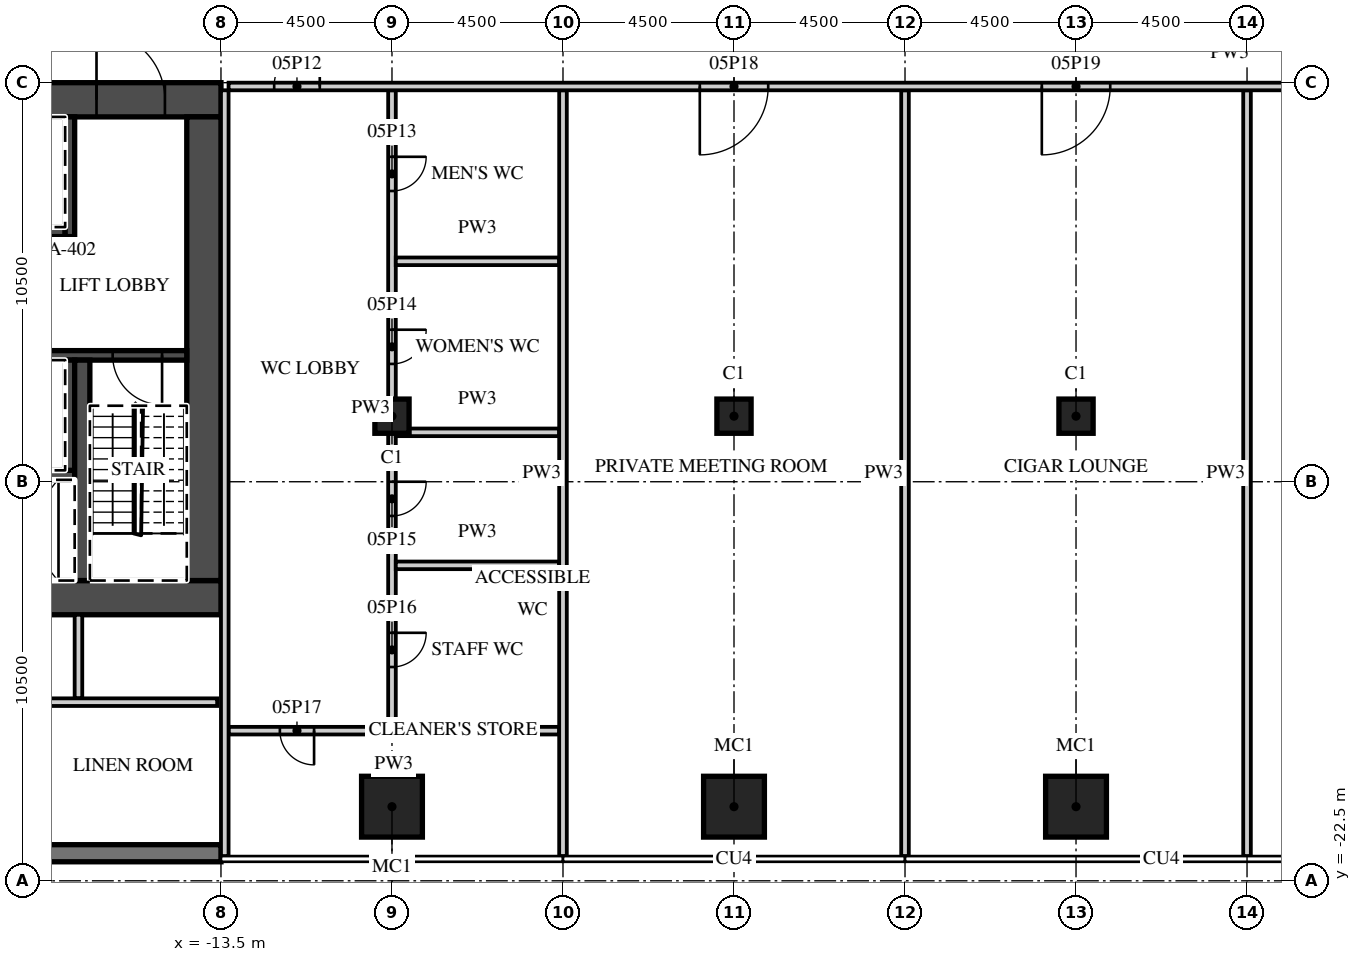
"""IFC4 building model, lengths in metres.
Left out: names, types, materials, properties, quantities, classifications, styles, units other than length and angle.
Written with IfcOpenShell. Run it as: python <this file> out.ifc"""

import sys

from ifc_helpers import new_model, si_unit, direction, frame, frame_2d, origin, origin_2d, place, context, subcontext, project, spatial, rectangle, extrude, element, fill, save


model = new_model("IFC4")
c1 = context("Model", 3, precision=1e-05, world=origin(), true_north=direction((0.0, 1.0)))
c2 = subcontext(c1, "Body", "Model", "MODEL_VIEW")
j1 = project(units=[si_unit("LENGTHUNIT", "METRE"), si_unit("PLANEANGLEUNIT", "RADIAN")], contexts=[c1])
p1 = place(None, origin())
s1 = spatial("IfcSite", under=j1, at=p1, CompositionType="ELEMENT")
p2 = place(p1, origin())
s2 = spatial("IfcBuilding", under=s1, at=p2, CompositionType="ELEMENT")
p3 = place(p2, frame((0.0, 0.0, 33.5)))
s3 = spatial("IfcBuildingStorey", under=s2, at=p3, CompositionType="ELEMENT", Elevation=33.5)
for number, where, z_axis, x_axis in (
    (1, (-9.0, -20.55, 0.0), (0.0, 0.0, 1.0), (1.0, 0.0, 0.0)),
    (2, (0.0, -20.55, 0.0), (0.0, 0.0, 1.0), (1.0, 0.0, 0.0)),
    (3, (9.0, -20.55, 0.0), (0.0, 0.0, 1.0), (1.0, 0.0, 0.0)),
):
    element("IfcColumn", number, at=place(p3, frame(where, z_axis=z_axis, x_axis=x_axis)), inside=s3, PredefinedType="COLUMN", context=c2, shape_type="SweptSolid", body=[
        extrude(rectangle(XDim=1.6, YDim=1.6, at=origin_2d()), origin(), (0.0, 0.0, 1.0), 4.5),
    ])
for number, where, z_axis, x_axis in (
    (4, (-9.0, -10.275, 0.0), (0.0, 0.0, 1.0), (1.0, 0.0, 0.0)),
    (5, (0.0, -10.275, 0.0), (0.0, 0.0, 1.0), (1.0, 0.0, 0.0)),
    (6, (9.0, -10.275, 0.0), (0.0, 0.0, 1.0), (1.0, 0.0, 0.0)),
):
    element("IfcColumn", number, at=place(p3, frame(where, z_axis=z_axis, x_axis=x_axis)), inside=s3, PredefinedType="COLUMN", context=c2, shape_type="SweptSolid", body=[
        extrude(rectangle(XDim=0.9, YDim=0.9, at=origin_2d()), origin(), (0.0, 0.0, 1.0), 4.5),
    ])
p4 = place(p3, frame((-31.5, -21.775, 0.0), z_axis=(0.0, 0.0, 1.0), x_axis=(1.0, 0.0, 0.0)))
e7 = element("IfcWall", 7, at=p4, inside=s3, PredefinedType="SOLIDWALL", context=c2, shape_type="SweptSolid", body=[
    extrude(rectangle(XDim=18.0, YDim=0.45, at=frame_2d((9.0, 0.0))), origin(), (0.0, 0.0, 1.0), 4.05),
])
p5 = place(p3, frame((-31.5, -1.95, 0.0), z_axis=(0.0, 0.0, 1.0), x_axis=(1.0, 0.0, 0.0)))
e8 = element("IfcWall", 8, at=p5, inside=s3, PredefinedType="SHEAR", context=c2, shape_type="SweptSolid", body=[
    extrude(rectangle(XDim=18.0, YDim=0.9, at=frame_2d((9.0, 0.0))), origin(), (0.0, 0.0, 1.0), 4.05),
])
p6 = place(p5, frame((14.725, 0.0, 0.0)))
e9 = element("IfcOpeningElement", 9, at=p6, cuts=e8, PredefinedType="OPENING", context=c2, shape_type="SweptSolid", body=[
    extrude(rectangle(XDim=1.8, YDim=2.1, at=frame_2d((0.9, 1.05))), frame((0.0, 0.46, 0.0), z_axis=(0.0, -1.0, 0.0), x_axis=(1.0, 0.0, 0.0)), (0.0, 0.0, 1.0), 0.92),
])
p7 = place(p3, frame((-20.3, -15.05, 0.0), z_axis=(0.0, 0.0, 1.0), x_axis=(1.0, 0.0, 0.0)))
e10 = element("IfcWall", 10, at=p7, inside=s3, PredefinedType="SHEAR", context=c2, shape_type="SweptSolid", body=[
    extrude(rectangle(XDim=6.8, YDim=0.9, at=frame_2d((3.4, 0.0))), origin(), (0.0, 0.0, 1.0), 4.05),
])
p8 = place(p7, frame((0.875, 0.0, 0.0)))
e11 = element("IfcOpeningElement", 11, at=p8, cuts=e10, PredefinedType="OPENING", context=c2, shape_type="SweptSolid", body=[
    extrude(rectangle(XDim=1.2, YDim=2.1, at=frame_2d((0.6, 1.05))), frame((0.0, 0.46, 0.0), z_axis=(0.0, -1.0, 0.0), x_axis=(1.0, 0.0, 0.0)), (0.0, 0.0, 1.0), 0.92),
])
p9 = place(p3, frame((-13.95, -14.6, 0.0), z_axis=(0.0, 0.0, 1.0), x_axis=(0.0, 1.0, 0.0)))
e12 = element("IfcWall", 12, at=p9, inside=s3, PredefinedType="SHEAR", context=c2, shape_type="SweptSolid", body=[
    extrude(rectangle(XDim=12.2, YDim=0.9, at=frame_2d((6.1, 0.0))), origin(), (0.0, 0.0, 1.0), 4.05),
])
p10 = place(p3, frame((-30.6, -5.425, 0.0), z_axis=(0.0, 0.0, 1.0), x_axis=(1.0, 0.0, 0.0)))
e13 = element("IfcWall", 13, at=p10, inside=s3, PredefinedType="SHEAR", context=c2, shape_type="SweptSolid", body=[
    extrude(rectangle(XDim=13.0, YDim=0.25, at=frame_2d((6.5, 0.0))), origin(), (0.0, 0.0, 1.0), 4.05),
])
p11 = place(p3, frame((-17.475, -5.55, 0.0), z_axis=(0.0, 0.0, 1.0), x_axis=(0.0, 1.0, 0.0)))
e14 = element("IfcWall", 14, at=p11, inside=s3, PredefinedType="SHEAR", context=c2, shape_type="SweptSolid", body=[
    extrude(rectangle(XDim=3.15, YDim=0.25, at=frame_2d((1.575, 0.0))), origin(), (0.0, 0.0, 1.0), 4.05),
])
p12 = place(p3, frame((-30.6, -8.675, 0.0), z_axis=(0.0, 0.0, 1.0), x_axis=(1.0, 0.0, 0.0)))
e15 = element("IfcWall", 15, at=p12, inside=s3, PredefinedType="SHEAR", context=c2, shape_type="SweptSolid", body=[
    extrude(rectangle(XDim=16.2, YDim=0.25, at=frame_2d((8.1, 0.0))), origin(), (0.0, 0.0, 1.0), 4.05),
])
p13 = place(p12, frame((0.6, 0.0, 0.0)))
e16 = element("IfcOpeningElement", 16, at=p13, cuts=e15, PredefinedType="OPENING", context=c2, shape_type="SweptSolid", body=[
    extrude(rectangle(XDim=1.2, YDim=2.1, at=frame_2d((0.6, 1.05))), frame((0.0, 0.135, 0.0), z_axis=(0.0, -1.0, 0.0), x_axis=(1.0, 0.0, 0.0)), (0.0, 0.0, 1.0), 0.27),
])
p14 = place(p12, frame((3.25, 0.0, 0.0)))
e17 = element("IfcOpeningElement", 17, at=p14, cuts=e15, PredefinedType="OPENING", context=c2, shape_type="SweptSolid", body=[
    extrude(rectangle(XDim=1.2, YDim=2.1, at=frame_2d((0.6, 1.05))), frame((0.0, 0.135, 0.0), z_axis=(0.0, -1.0, 0.0), x_axis=(1.0, 0.0, 0.0)), (0.0, 0.0, 1.0), 0.27),
])
p15 = place(p12, frame((5.9, 0.0, 0.0)))
e18 = element("IfcOpeningElement", 18, at=p15, cuts=e15, PredefinedType="OPENING", context=c2, shape_type="SweptSolid", body=[
    extrude(rectangle(XDim=1.2, YDim=2.1, at=frame_2d((0.6, 1.05))), frame((0.0, 0.135, 0.0), z_axis=(0.0, -1.0, 0.0), x_axis=(1.0, 0.0, 0.0)), (0.0, 0.0, 1.0), 0.27),
])
p16 = place(p12, frame((14.25, 0.0, 0.0)))
e19 = element("IfcOpeningElement", 19, at=p16, cuts=e15, PredefinedType="OPENING", context=c2, shape_type="SweptSolid", body=[
    extrude(rectangle(XDim=1.3, YDim=2.1, at=frame_2d((0.65, 1.05))), frame((0.0, 0.135, 0.0), z_axis=(0.0, -1.0, 0.0), x_axis=(1.0, 0.0, 0.0)), (0.0, 0.0, 1.0), 0.27),
])
p17 = place(p3, frame((-30.6, -11.825, 0.0), z_axis=(0.0, 0.0, 1.0), x_axis=(1.0, 0.0, 0.0)))
e20 = element("IfcWall", 20, at=p17, inside=s3, PredefinedType="SHEAR", context=c2, shape_type="SweptSolid", body=[
    extrude(rectangle(XDim=13.25, YDim=0.25, at=frame_2d((6.625, 0.0))), origin(), (0.0, 0.0, 1.0), 4.05),
])
p18 = place(p3, frame((-17.475, -11.7, 0.0), z_axis=(0.0, 0.0, 1.0), x_axis=(0.0, 1.0, 0.0)))
e21 = element("IfcWall", 21, at=p18, inside=s3, PredefinedType="SHEAR", context=c2, shape_type="SweptSolid", body=[
    extrude(rectangle(XDim=2.9, YDim=0.25, at=frame_2d((1.45, 0.0))), origin(), (0.0, 0.0, 1.0), 4.05),
])
p19 = place(p3, frame((-17.15, -14.6, 0.0), z_axis=(0.0, 0.0, 1.0), x_axis=(0.0, 1.0, 0.0)))
e22 = element("IfcWall", 22, at=p19, inside=s3, PredefinedType="SHEAR", context=c2, shape_type="SweptSolid", body=[
    extrude(rectangle(XDim=5.8, YDim=0.4, at=frame_2d((2.9, 0.0))), origin(), (0.0, 0.0, 1.0), 4.05),
])
p20 = place(p3, frame((-17.25, -17.7, 0.0), z_axis=(0.0, 0.0, 1.0), x_axis=(0.0, 1.0, 0.0)))
e23 = element("IfcWall", 23, at=p20, inside=s3, PredefinedType="PARTITIONING", context=c2, shape_type="SweptSolid", body=[
    extrude(rectangle(XDim=2.2, YDim=0.2, at=frame_2d((1.1, 0.0))), origin(), (0.0, 0.0, 1.0), 4.05),
])
p21 = place(p3, frame((-44.55, -17.8, 0.0), z_axis=(0.0, 0.0, 1.0), x_axis=(1.0, 0.0, 0.0)))
e24 = element("IfcWall", 24, at=p21, inside=s3, PredefinedType="PARTITIONING", context=c2, shape_type="SweptSolid", body=[
    extrude(rectangle(XDim=30.95, YDim=0.2, at=frame_2d((15.475, 0.0))), origin(), (0.0, 0.0, 1.0), 4.05),
])
p22 = place(p21, frame((13.438, 0.0, 0.0)))
e25 = element("IfcOpeningElement", 25, at=p22, cuts=e24, PredefinedType="OPENING", context=c2, shape_type="SweptSolid", body=[
    extrude(rectangle(XDim=0.9, YDim=2.1, at=frame_2d((0.45, 1.05))), frame((0.0, 0.11, 0.0), z_axis=(0.0, -1.0, 0.0), x_axis=(1.0, 0.0, 0.0)), (0.0, 0.0, 1.0), 0.22),
])
p23 = place(p21, frame((21.738, 0.0, 0.0)))
e26 = element("IfcOpeningElement", 26, at=p23, cuts=e24, PredefinedType="OPENING", context=c2, shape_type="SweptSolid", body=[
    extrude(rectangle(XDim=0.9, YDim=2.1, at=frame_2d((0.45, 1.05))), frame((0.0, 0.11, 0.0), z_axis=(0.0, -1.0, 0.0), x_axis=(1.0, 0.0, 0.0)), (0.0, 0.0, 1.0), 0.22),
])
p24 = place(p3, frame((-9.0, -18.45, 0.0), z_axis=(0.0, 0.0, 1.0), x_axis=(0.0, 1.0, 0.0)))
e27 = element("IfcWall", 27, at=p24, inside=s3, PredefinedType="PARTITIONING", context=c2, shape_type="SweptSolid", body=[
    extrude(rectangle(XDim=16.75, YDim=0.2, at=frame_2d((8.375, 0.0))), origin(), (0.0, 0.0, 1.0), 4.05),
])
p25 = place(p24, frame((14.1, 0.0, 0.0)))
e28 = element("IfcOpeningElement", 28, at=p25, cuts=e27, PredefinedType="OPENING", context=c2, shape_type="SweptSolid", body=[
    extrude(rectangle(XDim=0.9, YDim=2.1, at=frame_2d((0.45, 1.05))), frame((0.0, 0.11, 0.0), z_axis=(0.0, -1.0, 0.0), x_axis=(1.0, 0.0, 0.0)), (0.0, 0.0, 1.0), 0.22),
])
p26 = place(p24, frame((9.55, 0.0, 0.0)))
e29 = element("IfcOpeningElement", 29, at=p26, cuts=e27, PredefinedType="OPENING", context=c2, shape_type="SweptSolid", body=[
    extrude(rectangle(XDim=0.9, YDim=2.1, at=frame_2d((0.45, 1.05))), frame((0.0, 0.11, 0.0), z_axis=(0.0, -1.0, 0.0), x_axis=(1.0, 0.0, 0.0)), (0.0, 0.0, 1.0), 0.22),
])
p27 = place(p24, frame((5.55, 0.0, 0.0)))
e30 = element("IfcOpeningElement", 30, at=p27, cuts=e27, PredefinedType="OPENING", context=c2, shape_type="SweptSolid", body=[
    extrude(rectangle(XDim=0.9, YDim=2.1, at=frame_2d((0.45, 1.05))), frame((0.0, 0.11, 0.0), z_axis=(0.0, -1.0, 0.0), x_axis=(1.0, 0.0, 0.0)), (0.0, 0.0, 1.0), 0.22),
])
p28 = place(p24, frame((1.575, 0.0, 0.0)))
e31 = element("IfcOpeningElement", 31, at=p28, cuts=e27, PredefinedType="OPENING", context=c2, shape_type="SweptSolid", body=[
    extrude(rectangle(XDim=0.9, YDim=2.1, at=frame_2d((0.45, 1.05))), frame((0.0, 0.11, 0.0), z_axis=(0.0, -1.0, 0.0), x_axis=(1.0, 0.0, 0.0)), (0.0, 0.0, 1.0), 0.22),
])
for number, where, z_axis, x_axis in (
    (32, (-8.9, -6.2, 0.0), (0.0, 0.0, 1.0), (1.0, 0.0, 0.0)),
    (33, (-8.9, -10.7, 0.0), (0.0, 0.0, 1.0), (1.0, 0.0, 0.0)),
    (34, (-8.9, -14.2, 0.0), (0.0, 0.0, 1.0), (1.0, 0.0, 0.0)),
):
    element("IfcWall", number, at=place(p3, frame(where, z_axis=z_axis, x_axis=x_axis)), inside=s3, PredefinedType="PARTITIONING", context=c2, shape_type="SweptSolid", body=[
        extrude(rectangle(XDim=4.3, YDim=0.2, at=frame_2d((2.15, 0.0))), origin(), (0.0, 0.0, 1.0), 4.05),
    ])
p29 = place(p3, frame((-13.3, -18.55, 0.0), z_axis=(0.0, 0.0, 1.0), x_axis=(1.0, 0.0, 0.0)))
e35 = element("IfcWall", 35, at=p29, inside=s3, PredefinedType="PARTITIONING", context=c2, shape_type="SweptSolid", body=[
    extrude(rectangle(XDim=8.7, YDim=0.2, at=frame_2d((4.35, 0.0))), origin(), (0.0, 0.0, 1.0), 4.05),
])
p30 = place(p29, frame((1.35, 0.0, 0.0)))
e36 = element("IfcOpeningElement", 36, at=p30, cuts=e35, PredefinedType="OPENING", context=c2, shape_type="SweptSolid", body=[
    extrude(rectangle(XDim=0.9, YDim=2.1, at=frame_2d((0.45, 1.05))), frame((0.0, 0.11, 0.0), z_axis=(0.0, -1.0, 0.0), x_axis=(1.0, 0.0, 0.0)), (0.0, 0.0, 1.0), 0.22),
])
for number, where, z_axis, x_axis in (
    (37, (-4.5, -21.85, 0.0), (0.0, 0.0, 1.0), (0.0, 1.0, 0.0)),
    (38, (4.5, -21.85, 0.0), (0.0, 0.0, 1.0), (0.0, 1.0, 0.0)),
    (39, (13.5, -21.85, 0.0), (0.0, 0.0, 1.0), (0.0, 1.0, 0.0)),
):
    element("IfcWall", number, at=place(p3, frame(where, z_axis=z_axis, x_axis=x_axis)), inside=s3, PredefinedType="PARTITIONING", context=c2, shape_type="SweptSolid", body=[
        extrude(rectangle(XDim=20.15, YDim=0.2, at=frame_2d((10.075, 0.0))), origin(), (0.0, 0.0, 1.0), 4.05),
    ])
p31 = place(p3, frame((-13.3, -1.6, 0.0), z_axis=(0.0, 0.0, 1.0), x_axis=(1.0, 0.0, 0.0)))
e40 = element("IfcWall", 40, at=p31, inside=s3, PredefinedType="PARTITIONING", context=c2, shape_type="SweptSolid", body=[
    extrude(rectangle(XDim=52.7, YDim=0.2, at=frame_2d((26.35, 0.0))), origin(), (0.0, 0.0, 1.0), 4.05),
])
p32 = place(p31, frame((1.2, 0.0, 0.0)))
e41 = element("IfcOpeningElement", 41, at=p32, cuts=e40, PredefinedType="OPENING", context=c2, shape_type="SweptSolid", body=[
    extrude(rectangle(XDim=1.2, YDim=2.1, at=frame_2d((0.6, 1.05))), frame((0.0, 0.11, 0.0), z_axis=(0.0, -1.0, 0.0), x_axis=(1.0, 0.0, 0.0)), (0.0, 0.0, 1.0), 0.22),
])
p33 = place(p31, frame((12.4, 0.0, 0.0)))
e42 = element("IfcOpeningElement", 42, at=p33, cuts=e40, PredefinedType="OPENING", context=c2, shape_type="SweptSolid", body=[
    extrude(rectangle(XDim=1.8, YDim=2.1, at=frame_2d((0.9, 1.05))), frame((0.0, 0.11, 0.0), z_axis=(0.0, -1.0, 0.0), x_axis=(1.0, 0.0, 0.0)), (0.0, 0.0, 1.0), 0.22),
])
p34 = place(p31, frame((21.4, 0.0, 0.0)))
e43 = element("IfcOpeningElement", 43, at=p34, cuts=e40, PredefinedType="OPENING", context=c2, shape_type="SweptSolid", body=[
    extrude(rectangle(XDim=1.8, YDim=2.1, at=frame_2d((0.9, 1.05))), frame((0.0, 0.11, 0.0), z_axis=(0.0, -1.0, 0.0), x_axis=(1.0, 0.0, 0.0)), (0.0, 0.0, 1.0), 0.22),
])
p35 = place(p31, frame((31.34, 0.0, 0.0)))
e44 = element("IfcOpeningElement", 44, at=p35, cuts=e40, PredefinedType="OPENING", context=c2, shape_type="SweptSolid", body=[
    extrude(rectangle(XDim=1.8, YDim=2.1, at=frame_2d((0.9, 1.05))), frame((0.0, 0.11, 0.0), z_axis=(0.0, -1.0, 0.0), x_axis=(1.0, 0.0, 0.0)), (0.0, 0.0, 1.0), 0.22),
])
p36 = place(p31, frame((38.46, 0.0, 0.0)))
e45 = element("IfcOpeningElement", 45, at=p36, cuts=e40, PredefinedType="OPENING", context=c2, shape_type="SweptSolid", body=[
    extrude(rectangle(XDim=1.8, YDim=2.1, at=frame_2d((0.9, 1.05))), frame((0.0, 0.11, 0.0), z_axis=(0.0, -1.0, 0.0), x_axis=(1.0, 0.0, 0.0)), (0.0, 0.0, 1.0), 0.22),
])
p37 = place(p31, frame((48.2, 0.0, 0.0)))
e46 = element("IfcOpeningElement", 46, at=p37, cuts=e40, PredefinedType="OPENING", context=c2, shape_type="SweptSolid", body=[
    extrude(rectangle(XDim=1.0, YDim=2.1, at=frame_2d((0.5, 1.05))), frame((0.0, 0.11, 0.0), z_axis=(0.0, -1.0, 0.0), x_axis=(1.0, 0.0, 0.0)), (0.0, 0.0, 1.0), 0.22),
])
p38 = place(p3, frame((-13.4, -21.85, 0.0), z_axis=(0.0, 0.0, 1.0), x_axis=(0.0, 1.0, 0.0)))
e47 = element("IfcWall", 47, at=p38, inside=s3, PredefinedType="PARTITIONING", context=c2, shape_type="SweptSolid", body=[
    extrude(rectangle(XDim=20.15, YDim=0.2, at=frame_2d((10.075, 0.0))), origin(), (0.0, 0.0, 1.0), 4.05),
])
p39 = place(p6, origin())
e48 = element("IfcDoor", 48, at=p39, inside=s3, OperationType="DOUBLE_DOOR_DOUBLE_SWING", PredefinedType="DOOR", context=c2, shape_type="SweptSolid", body=[
    extrude(rectangle(XDim=1.8, YDim=2.1, at=frame_2d((0.9, 1.05))), frame((0.0, 0.025, 0.0), z_axis=(0.0, -1.0, 0.0), x_axis=(1.0, 0.0, 0.0)), (0.0, 0.0, 1.0), 0.05),
])
fill(e9, e48)
p40 = place(p16, origin())
e49 = element("IfcDoor", 49, at=p40, inside=s3, OperationType="SINGLE_SWING_RIGHT", PredefinedType="DOOR", context=c2, shape_type="SweptSolid", body=[
    extrude(rectangle(XDim=1.3, YDim=2.1, at=frame_2d((0.65, 1.05))), frame((0.0, 0.025, 0.0), z_axis=(0.0, -1.0, 0.0), x_axis=(1.0, 0.0, 0.0)), (0.0, 0.0, 1.0), 0.05),
])
fill(e19, e49)
p41 = place(p32, origin())
e50 = element("IfcDoor", 50, at=p41, inside=s3, OperationType="SINGLE_SWING_RIGHT", PredefinedType="DOOR", context=c2, shape_type="SweptSolid", body=[
    extrude(rectangle(XDim=1.2, YDim=2.1, at=frame_2d((0.6, 1.05))), frame((0.0, 0.025, 0.0), z_axis=(0.0, -1.0, 0.0), x_axis=(1.0, 0.0, 0.0)), (0.0, 0.0, 1.0), 0.05),
])
fill(e41, e50)
p42 = place(p25, origin())
e51 = element("IfcDoor", 51, at=p42, inside=s3, OperationType="SINGLE_SWING_RIGHT", PredefinedType="DOOR", context=c2, shape_type="SweptSolid", body=[
    extrude(rectangle(XDim=0.9, YDim=2.1, at=frame_2d((0.45, 1.05))), frame((0.0, 0.025, 0.0), z_axis=(0.0, -1.0, 0.0), x_axis=(1.0, 0.0, 0.0)), (0.0, 0.0, 1.0), 0.05),
])
fill(e28, e51)
p43 = place(p26, origin())
e52 = element("IfcDoor", 52, at=p43, inside=s3, OperationType="SINGLE_SWING_RIGHT", PredefinedType="DOOR", context=c2, shape_type="SweptSolid", body=[
    extrude(rectangle(XDim=0.9, YDim=2.1, at=frame_2d((0.45, 1.05))), frame((0.0, 0.025, 0.0), z_axis=(0.0, -1.0, 0.0), x_axis=(1.0, 0.0, 0.0)), (0.0, 0.0, 1.0), 0.05),
])
fill(e29, e52)
p44 = place(p27, origin())
e53 = element("IfcDoor", 53, at=p44, inside=s3, OperationType="SINGLE_SWING_RIGHT", PredefinedType="DOOR", context=c2, shape_type="SweptSolid", body=[
    extrude(rectangle(XDim=0.9, YDim=2.1, at=frame_2d((0.45, 1.05))), frame((0.0, 0.025, 0.0), z_axis=(0.0, -1.0, 0.0), x_axis=(1.0, 0.0, 0.0)), (0.0, 0.0, 1.0), 0.05),
])
fill(e30, e53)
p45 = place(p28, origin())
e54 = element("IfcDoor", 54, at=p45, inside=s3, OperationType="SINGLE_SWING_RIGHT", PredefinedType="DOOR", context=c2, shape_type="SweptSolid", body=[
    extrude(rectangle(XDim=0.9, YDim=2.1, at=frame_2d((0.45, 1.05))), frame((0.0, 0.025, 0.0), z_axis=(0.0, -1.0, 0.0), x_axis=(1.0, 0.0, 0.0)), (0.0, 0.0, 1.0), 0.05),
])
fill(e31, e54)
p46 = place(p30, origin())
e55 = element("IfcDoor", 55, at=p46, inside=s3, OperationType="SINGLE_SWING_RIGHT", PredefinedType="DOOR", context=c2, shape_type="SweptSolid", body=[
    extrude(rectangle(XDim=0.9, YDim=2.1, at=frame_2d((0.45, 1.05))), frame((0.0, 0.025, 0.0), z_axis=(0.0, -1.0, 0.0), x_axis=(1.0, 0.0, 0.0)), (0.0, 0.0, 1.0), 0.05),
])
fill(e36, e55)
p47 = place(p33, origin())
e56 = element("IfcDoor", 56, at=p47, inside=s3, OperationType="DOUBLE_DOOR_DOUBLE_SWING", PredefinedType="DOOR", context=c2, shape_type="SweptSolid", body=[
    extrude(rectangle(XDim=1.8, YDim=2.1, at=frame_2d((0.9, 1.05))), frame((0.0, 0.025, 0.0), z_axis=(0.0, -1.0, 0.0), x_axis=(1.0, 0.0, 0.0)), (0.0, 0.0, 1.0), 0.05),
])
fill(e42, e56)
p48 = place(p34, origin())
e57 = element("IfcDoor", 57, at=p48, inside=s3, OperationType="DOUBLE_DOOR_DOUBLE_SWING", PredefinedType="DOOR", context=c2, shape_type="SweptSolid", body=[
    extrude(rectangle(XDim=1.8, YDim=2.1, at=frame_2d((0.9, 1.05))), frame((0.0, 0.025, 0.0), z_axis=(0.0, -1.0, 0.0), x_axis=(1.0, 0.0, 0.0)), (0.0, 0.0, 1.0), 0.05),
])
fill(e43, e57)
save(model, sys.argv[1])
